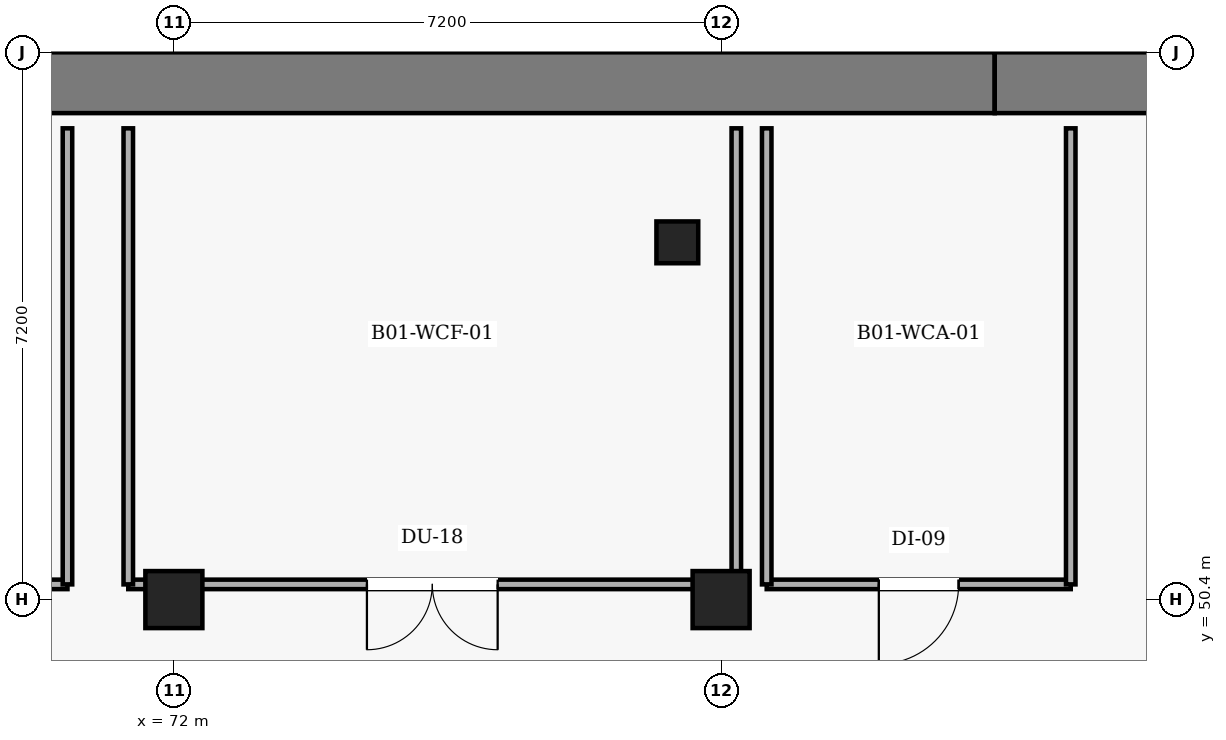
"""IFC4 building model, lengths in metres.
Left out: names, types, materials, properties, quantities, classifications, styles, units other than length and angle.
Written with IfcOpenShell. Run it as: python <this file> out.ifc"""

import sys

from ifc_helpers import new_model, si_unit, direction, frame, frame_2d, origin, origin_2d, place, context, subcontext, project, spatial, rectangle, extrude, element, fill, save


model = new_model("IFC4")
c1 = context("Model", 3, precision=1e-05, world=origin(), true_north=direction((0.0, 1.0)))
c2 = subcontext(c1, "Body", "Model", "MODEL_VIEW")
j1 = project(units=[si_unit("LENGTHUNIT", "METRE"), si_unit("PLANEANGLEUNIT", "RADIAN")], contexts=[c1])
p1 = place(None, origin())
s1 = spatial("IfcSite", under=j1, at=p1, CompositionType="ELEMENT")
p2 = place(p1, origin())
s2 = spatial("IfcBuilding", under=s1, at=p2, CompositionType="ELEMENT")
p3 = place(p2, frame((0.0, 0.0, -5.4)))
s3 = spatial("IfcBuildingStorey", under=s2, at=p3, CompositionType="ELEMENT", Elevation=-5.4)
for number, where, z_axis, x_axis in (
    (1, (69.3, 57.2, 0.0), (0.0, 0.0, 1.0), (1.0, 0.0, 0.0)),
    (2, (82.8, 57.2, 0.0), (0.0, 0.0, 1.0), (1.0, 0.0, 0.0)),
):
    element("IfcWall", number, at=place(p3, frame(where, z_axis=z_axis, x_axis=x_axis)), inside=s3, PredefinedType="USERDEFINED", context=c2, shape_type="SweptSolid", body=[
        extrude(rectangle(XDim=13.5, YDim=0.8, at=frame_2d((6.75, 0.0))), origin(), (0.0, 0.0, 1.0), 4.95),
    ])
for number, where, z_axis, x_axis in (
    (3, (72.0, 50.4, 0.0), (0.0, 0.0, 1.0), (1.0, 0.0, 0.0)),
    (4, (79.2, 50.4, 0.0), (0.0, 0.0, 1.0), (1.0, 0.0, 0.0)),
):
    element("IfcColumn", number, at=place(p3, frame(where, z_axis=z_axis, x_axis=x_axis)), inside=s3, PredefinedType="COLUMN", context=c2, shape_type="SweptSolid", body=[
        extrude(rectangle(XDim=0.75, YDim=0.75, at=origin_2d()), origin(), (0.0, 0.0, 1.0), 4.95),
    ])
p4 = place(p3, frame((78.624, 55.1, 0.0), z_axis=(0.0, 0.0, 1.0), x_axis=(1.0, 0.0, 0.0)))
e5 = element("IfcColumn", 5, at=p4, inside=s3, PredefinedType="COLUMN", context=c2, shape_type="SweptSolid", body=[
    extrude(rectangle(XDim=0.55, YDim=0.55, at=origin_2d()), origin(), (0.0, 0.0, 1.0), 4.95),
])
p5 = place(p3, frame((70.6, 50.6, 0.0), z_axis=(0.0, 0.0, 1.0), x_axis=(-1.0, 0.0, 0.0)))
e6 = element("IfcWall", 6, at=p5, inside=s3, PredefinedType="PARTITIONING", context=c2, shape_type="SweptSolid", body=[
    extrude(rectangle(XDim=8.8, YDim=0.125, at=frame_2d((4.4, 0.0))), origin(), (0.0, 0.0, 1.0), 4.15),
])
p6 = place(p5, frame((2.94, 0.0, 0.0)))
e7 = element("IfcOpeningElement", 7, at=p6, cuts=e6, PredefinedType="OPENING", context=c2, shape_type="SweptSolid", body=[
    extrude(rectangle(XDim=1.72, YDim=2.22, at=frame_2d((0.86, 1.11))), frame((0.0, 0.073, 0.0), z_axis=(0.0, -1.0, 0.0), x_axis=(1.0, 0.0, 0.0)), (0.0, 0.0, 1.0), 0.145),
])
p7 = place(p3, frame((70.6, 56.6, 0.0), z_axis=(0.0, 0.0, 1.0), x_axis=(0.0, -1.0, 0.0)))
e8 = element("IfcWall", 8, at=p7, inside=s3, PredefinedType="PARTITIONING", context=c2, shape_type="SweptSolid", body=[
    extrude(rectangle(XDim=6.0, YDim=0.125, at=frame_2d((3.0, 0.0))), origin(), (0.0, 0.0, 1.0), 5.05),
])
p8 = place(p3, frame((79.4, 50.6, 0.0), z_axis=(0.0, 0.0, 1.0), x_axis=(-1.0, 0.0, 0.0)))
e9 = element("IfcWall", 9, at=p8, inside=s3, PredefinedType="PARTITIONING", context=c2, shape_type="SweptSolid", body=[
    extrude(rectangle(XDim=8.0, YDim=0.125, at=frame_2d((4.0, 0.0))), origin(), (0.0, 0.0, 1.0), 4.15),
])
p9 = place(p8, frame((3.14, 0.0, 0.0)))
e10 = element("IfcOpeningElement", 10, at=p9, cuts=e9, PredefinedType="OPENING", context=c2, shape_type="SweptSolid", body=[
    extrude(rectangle(XDim=1.72, YDim=2.22, at=frame_2d((0.86, 1.11))), frame((0.0, 0.073, 0.0), z_axis=(0.0, -1.0, 0.0), x_axis=(1.0, 0.0, 0.0)), (0.0, 0.0, 1.0), 0.145),
])
for number, where, z_axis, x_axis in (
    (11, (79.4, 56.6, 0.0), (0.0, 0.0, 1.0), (0.0, -1.0, 0.0)),
    (12, (71.4, 50.6, 0.0), (0.0, 0.0, 1.0), (0.0, 1.0, 0.0)),
):
    element("IfcWall", number, at=place(p3, frame(where, z_axis=z_axis, x_axis=x_axis)), inside=s3, PredefinedType="PARTITIONING", context=c2, shape_type="SweptSolid", body=[
        extrude(rectangle(XDim=6.0, YDim=0.125, at=frame_2d((3.0, 0.0))), origin(), (0.0, 0.0, 1.0), 5.05),
    ])
p10 = place(p3, frame((83.8, 50.6, 0.0), z_axis=(0.0, 0.0, 1.0), x_axis=(-1.0, 0.0, 0.0)))
e13 = element("IfcWall", 13, at=p10, inside=s3, PredefinedType="PARTITIONING", context=c2, shape_type="SweptSolid", body=[
    extrude(rectangle(XDim=4.0, YDim=0.125, at=frame_2d((2.0, 0.0))), origin(), (0.0, 0.0, 1.0), 4.45),
])
p11 = place(p10, frame((1.475, 0.0, 0.0)))
e14 = element("IfcOpeningElement", 14, at=p11, cuts=e13, PredefinedType="OPENING", context=c2, shape_type="SweptSolid", body=[
    extrude(rectangle(XDim=1.05, YDim=2.1, at=frame_2d((0.525, 1.05))), frame((0.0, 0.073, 0.0), z_axis=(0.0, -1.0, 0.0), x_axis=(1.0, 0.0, 0.0)), (0.0, 0.0, 1.0), 0.145),
])
for number, where, z_axis, x_axis in (
    (15, (83.8, 56.6, 0.0), (0.0, 0.0, 1.0), (0.0, -1.0, 0.0)),
    (16, (79.8, 50.6, 0.0), (0.0, 0.0, 1.0), (0.0, 1.0, 0.0)),
):
    element("IfcWall", number, at=place(p3, frame(where, z_axis=z_axis, x_axis=x_axis)), inside=s3, PredefinedType="PARTITIONING", context=c2, shape_type="SweptSolid", body=[
        extrude(rectangle(XDim=6.0, YDim=0.125, at=frame_2d((3.0, 0.0))), origin(), (0.0, 0.0, 1.0), 5.05),
    ])
p12 = place(p9, origin())
e17 = element("IfcDoor", 17, at=p12, inside=s3, OperationType="DOUBLE_DOOR_SINGLE_SWING", PredefinedType="DOOR", context=c2, shape_type="SweptSolid", body=[
    extrude(rectangle(XDim=1.72, YDim=2.22, at=frame_2d((0.86, 1.11))), frame((0.0, 0.025, 0.0), z_axis=(0.0, -1.0, 0.0), x_axis=(1.0, 0.0, 0.0)), (0.0, 0.0, 1.0), 0.05),
])
fill(e10, e17)
p13 = place(p11, origin())
e18 = element("IfcDoor", 18, at=p13, inside=s3, OperationType="SINGLE_SWING_RIGHT", PredefinedType="DOOR", context=c2, shape_type="SweptSolid", body=[
    extrude(rectangle(XDim=1.05, YDim=2.1, at=frame_2d((0.525, 1.05))), frame((0.0, 0.025, 0.0), z_axis=(0.0, -1.0, 0.0), x_axis=(1.0, 0.0, 0.0)), (0.0, 0.0, 1.0), 0.05),
])
fill(e14, e18)
save(model, sys.argv[1])
